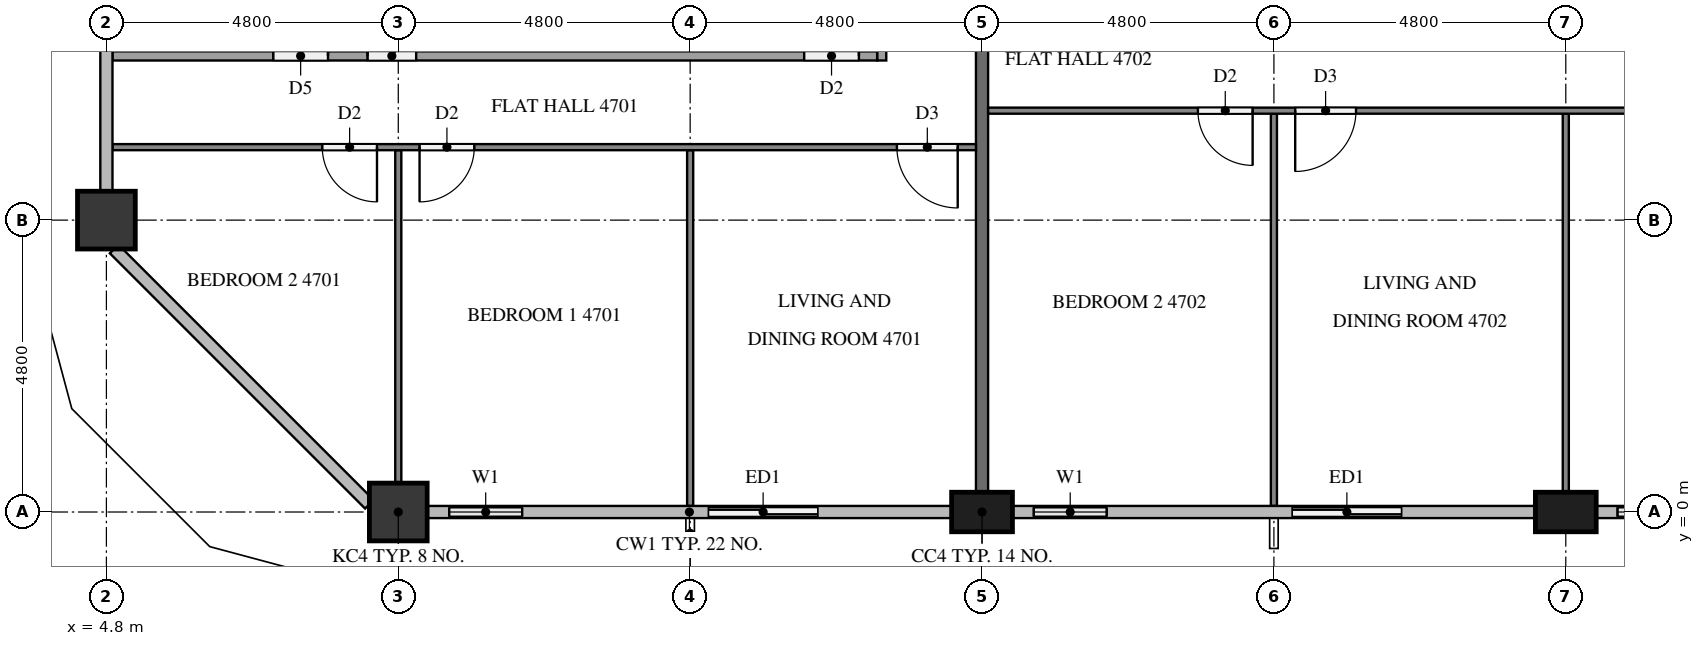
"""IFC4 building model, lengths in metres.
Left out: names, types, materials, properties, quantities, classifications, styles, units other than length and angle.
Written with IfcOpenShell. Run it as: python <this file> out.ifc"""

import sys

from ifc_helpers import new_model, si_unit, direction, frame, frame_2d, origin, origin_2d, place, context, subcontext, project, spatial, rectangle, extrude, element, fill, save


model = new_model("IFC4")
c1 = context("Model", 3, precision=1e-05, world=origin(), true_north=direction((0.0, 1.0)))
c2 = subcontext(c1, "Body", "Model", "MODEL_VIEW")
j1 = project(units=[si_unit("LENGTHUNIT", "METRE"), si_unit("PLANEANGLEUNIT", "RADIAN")], contexts=[c1])
p1 = place(None, origin())
s1 = spatial("IfcSite", under=j1, at=p1, CompositionType="ELEMENT")
p2 = place(p1, origin())
s2 = spatial("IfcBuilding", under=s1, at=p2, CompositionType="ELEMENT")
p3 = place(p2, frame((0.0, 0.0, 182.4)))
s3 = spatial("IfcBuildingStorey", under=s2, at=p3, CompositionType="ELEMENT", Elevation=182.4)
p4 = place(p3, frame((9.6, 0.0, 0.0), z_axis=(0.0, 0.0, 1.0), x_axis=(1.0, 0.0, 0.0)))
e1 = element("IfcColumn", 1, at=p4, inside=s3, PredefinedType="COLUMN", context=c2, shape_type="SweptSolid", body=[
    extrude(rectangle(XDim=0.95, YDim=0.95, at=origin_2d()), origin(), (0.0, 0.0, 1.0), 3.2),
])
for number, where, z_axis, x_axis in (
    (2, (19.2, 0.0, 0.0), (0.0, 0.0, 1.0), (1.0, 0.0, 0.0)),
    (3, (28.8, 0.0, 0.0), (0.0, 0.0, 1.0), (1.0, 0.0, 0.0)),
):
    element("IfcColumn", number, at=place(p3, frame(where, z_axis=z_axis, x_axis=x_axis)), inside=s3, PredefinedType="COLUMN", context=c2, shape_type="SweptSolid", body=[
        extrude(rectangle(XDim=1.0, YDim=0.65, at=origin_2d()), origin(), (0.0, 0.0, 1.0), 3.2),
    ])
p5 = place(p3, frame((4.8, 4.8, 0.0), z_axis=(0.0, 0.0, 1.0), x_axis=(1.0, 0.0, 0.0)))
e4 = element("IfcColumn", 4, at=p5, inside=s3, PredefinedType="COLUMN", context=c2, shape_type="SweptSolid", body=[
    extrude(rectangle(XDim=0.95, YDim=0.95, at=origin_2d()), origin(), (0.0, 0.0, 1.0), 3.2),
])
p6 = place(p3, frame((10.075, 0.0, 0.0), z_axis=(0.0, 0.0, 1.0), x_axis=(1.0, 0.0, 0.0)))
e5 = element("IfcWall", 5, at=p6, inside=s3, PredefinedType="SOLIDWALL", context=c2, shape_type="SweptSolid", body=[
    extrude(rectangle(XDim=1.925, YDim=0.15, at=frame_2d((0.962, 0.0))), origin(), (0.0, 0.0, 1.0), 3.2),
])
p7 = place(p6, frame((0.363, 0.0, 0.9)))
e6 = element("IfcOpeningElement", 6, at=p7, cuts=e5, PredefinedType="OPENING", context=c2, shape_type="SweptSolid", body=[
    extrude(rectangle(XDim=1.2, YDim=1.4, at=frame_2d((0.6, 0.7))), frame((0.0, 0.085, 0.0), z_axis=(0.0, -1.0, 0.0), x_axis=(1.0, 0.0, 0.0)), (0.0, 0.0, 1.0), 0.17),
])
p8 = place(p3, frame((14.4, 0.0, 0.0), z_axis=(0.0, 0.0, 1.0), x_axis=(1.0, 0.0, 0.0)))
e7 = element("IfcWall", 7, at=p8, inside=s3, PredefinedType="SOLIDWALL", context=c2, shape_type="SweptSolid", body=[
    extrude(rectangle(XDim=2.4, YDim=0.15, at=frame_2d((1.2, 0.0))), origin(), (0.0, 0.0, 1.0), 3.2),
])
p9 = place(p8, frame((0.3, 0.0, 0.0)))
e8 = element("IfcOpeningElement", 8, at=p9, cuts=e7, PredefinedType="OPENING", context=c2, shape_type="SweptSolid", body=[
    extrude(rectangle(XDim=1.8, YDim=2.4, at=frame_2d((0.9, 1.2))), frame((0.0, 0.085, 0.0), z_axis=(0.0, -1.0, 0.0), x_axis=(1.0, 0.0, 0.0)), (0.0, 0.0, 1.0), 0.17),
])
p10 = place(p3, frame((19.7, 0.0, 0.0), z_axis=(0.0, 0.0, 1.0), x_axis=(1.0, 0.0, 0.0)))
e9 = element("IfcWall", 9, at=p10, inside=s3, PredefinedType="SOLIDWALL", context=c2, shape_type="SweptSolid", body=[
    extrude(rectangle(XDim=1.9, YDim=0.15, at=frame_2d((0.95, 0.0))), origin(), (0.0, 0.0, 1.0), 3.2),
])
p11 = place(p10, frame((0.35, 0.0, 0.9)))
e10 = element("IfcOpeningElement", 10, at=p11, cuts=e9, PredefinedType="OPENING", context=c2, shape_type="SweptSolid", body=[
    extrude(rectangle(XDim=1.2, YDim=1.4, at=frame_2d((0.6, 0.7))), frame((0.0, 0.085, 0.0), z_axis=(0.0, -1.0, 0.0), x_axis=(1.0, 0.0, 0.0)), (0.0, 0.0, 1.0), 0.17),
])
p12 = place(p3, frame((24.0, 0.0, 0.0), z_axis=(0.0, 0.0, 1.0), x_axis=(1.0, 0.0, 0.0)))
e11 = element("IfcWall", 11, at=p12, inside=s3, PredefinedType="SOLIDWALL", context=c2, shape_type="SweptSolid", body=[
    extrude(rectangle(XDim=2.4, YDim=0.15, at=frame_2d((1.2, 0.0))), origin(), (0.0, 0.0, 1.0), 3.2),
])
p13 = place(p12, frame((0.3, 0.0, 0.0)))
e12 = element("IfcOpeningElement", 12, at=p13, cuts=e11, PredefinedType="OPENING", context=c2, shape_type="SweptSolid", body=[
    extrude(rectangle(XDim=1.8, YDim=2.4, at=frame_2d((0.9, 1.2))), frame((0.0, 0.085, 0.0), z_axis=(0.0, -1.0, 0.0), x_axis=(1.0, 0.0, 0.0)), (0.0, 0.0, 1.0), 0.17),
])
p14 = place(p3, frame((29.3, 0.0, 0.0), z_axis=(0.0, 0.0, 1.0), x_axis=(1.0, 0.0, 0.0)))
e13 = element("IfcWall", 13, at=p14, inside=s3, PredefinedType="SOLIDWALL", context=c2, shape_type="SweptSolid", body=[
    extrude(rectangle(XDim=1.9, YDim=0.15, at=frame_2d((0.95, 0.0))), origin(), (0.0, 0.0, 1.0), 3.2),
])
p15 = place(p14, frame((0.35, 0.0, 0.9)))
e14 = element("IfcOpeningElement", 14, at=p15, cuts=e13, PredefinedType="OPENING", context=c2, shape_type="SweptSolid", body=[
    extrude(rectangle(XDim=1.2, YDim=1.4, at=frame_2d((0.6, 0.7))), frame((0.0, 0.085, 0.0), z_axis=(0.0, -1.0, 0.0), x_axis=(1.0, 0.0, 0.0)), (0.0, 0.0, 1.0), 0.17),
])
p16 = place(p3, frame((19.2, 11.9, 0.0), z_axis=(0.0, 0.0, 1.0), x_axis=(0.0, -1.0, 0.0)))
e15 = element("IfcWall", 15, at=p16, inside=s3, PredefinedType="PARTITIONING", context=c2, shape_type="SweptSolid", body=[
    extrude(rectangle(XDim=11.575, YDim=0.2, at=frame_2d((5.788, 0.0))), origin(), (0.0, 0.0, 1.0), 3.2),
])
p17 = place(p3, frame((14.4, 5.95, 0.0), z_axis=(0.0, 0.0, 1.0), x_axis=(0.0, -1.0, 0.0)))
e16 = element("IfcWall", 16, at=p17, inside=s3, PredefinedType="PARTITIONING", context=c2, shape_type="SweptSolid", body=[
    extrude(rectangle(XDim=5.85, YDim=0.1, at=frame_2d((2.925, 0.0))), origin(), (0.0, 0.0, 1.0), 3.2),
])
p18 = place(p3, frame((9.6, 5.95, 0.0), z_axis=(0.0, 0.0, 1.0), x_axis=(0.0, -1.0, 0.0)))
e17 = element("IfcWall", 17, at=p18, inside=s3, PredefinedType="PARTITIONING", context=c2, shape_type="SweptSolid", body=[
    extrude(rectangle(XDim=5.475, YDim=0.1, at=frame_2d((2.737, 0.0))), origin(), (0.0, 0.0, 1.0), 3.2),
])
p19 = place(p3, frame((19.1, 6.0, 0.0), z_axis=(0.0, 0.0, 1.0), x_axis=(-1.0, 0.0, 0.0)))
e18 = element("IfcWall", 18, at=p19, inside=s3, PredefinedType="PARTITIONING", context=c2, shape_type="SweptSolid", body=[
    extrude(rectangle(XDim=14.2, YDim=0.1, at=frame_2d((7.1, 0.0))), origin(), (0.0, 0.0, 1.0), 3.2),
])
p20 = place(p19, frame((0.3, 0.0, 0.0)))
e19 = element("IfcOpeningElement", 19, at=p20, cuts=e18, PredefinedType="OPENING", context=c2, shape_type="SweptSolid", body=[
    extrude(rectangle(XDim=1.0, YDim=2.1, at=frame_2d((0.5, 1.05))), frame((0.0, 0.06, 0.0), z_axis=(0.0, -1.0, 0.0), x_axis=(1.0, 0.0, 0.0)), (0.0, 0.0, 1.0), 0.12),
])
p21 = place(p19, frame((8.25, 0.0, 0.0)))
e20 = element("IfcOpeningElement", 20, at=p21, cuts=e18, PredefinedType="OPENING", context=c2, shape_type="SweptSolid", body=[
    extrude(rectangle(XDim=0.9, YDim=2.1, at=frame_2d((0.45, 1.05))), frame((0.0, 0.06, 0.0), z_axis=(0.0, -1.0, 0.0), x_axis=(1.0, 0.0, 0.0)), (0.0, 0.0, 1.0), 0.12),
])
p22 = place(p19, frame((9.85, 0.0, 0.0)))
e21 = element("IfcOpeningElement", 21, at=p22, cuts=e18, PredefinedType="OPENING", context=c2, shape_type="SweptSolid", body=[
    extrude(rectangle(XDim=0.9, YDim=2.1, at=frame_2d((0.45, 1.05))), frame((0.0, 0.06, 0.0), z_axis=(0.0, -1.0, 0.0), x_axis=(1.0, 0.0, 0.0)), (0.0, 0.0, 1.0), 0.12),
])
p23 = place(p3, frame((17.55, 11.9, 0.0), z_axis=(0.0, 0.0, 1.0), x_axis=(0.0, -1.0, 0.0)))
e22 = element("IfcWall", 22, at=p23, inside=s3, PredefinedType="PARTITIONING", context=c2, shape_type="SweptSolid", body=[
    extrude(rectangle(XDim=4.475, YDim=0.15, at=frame_2d((2.237, 0.0))), origin(), (0.0, 0.0, 1.0), 3.2),
])
p24 = place(p3, frame((4.9, 7.5, 0.0), z_axis=(0.0, 0.0, 1.0), x_axis=(1.0, 0.0, 0.0)))
e23 = element("IfcWall", 23, at=p24, inside=s3, PredefinedType="PARTITIONING", context=c2, shape_type="SweptSolid", body=[
    extrude(rectangle(XDim=12.575, YDim=0.15, at=frame_2d((6.288, 0.0))), origin(), (0.0, 0.0, 1.0), 3.2),
])
p25 = place(p24, frame((11.375, 0.0, 0.0)))
e24 = element("IfcOpeningElement", 24, at=p25, cuts=e23, PredefinedType="OPENING", context=c2, shape_type="SweptSolid", body=[
    extrude(rectangle(XDim=0.9, YDim=2.1, at=frame_2d((0.45, 1.05))), frame((0.0, 0.085, 0.0), z_axis=(0.0, -1.0, 0.0), x_axis=(1.0, 0.0, 0.0)), (0.0, 0.0, 1.0), 0.17),
])
p26 = place(p24, frame((4.194, 0.0, 0.0)))
e25 = element("IfcOpeningElement", 25, at=p26, cuts=e23, PredefinedType="OPENING", context=c2, shape_type="SweptSolid", body=[
    extrude(rectangle(XDim=0.8, YDim=2.1, at=frame_2d((0.4, 1.05))), frame((0.0, 0.085, 0.0), z_axis=(0.0, -1.0, 0.0), x_axis=(1.0, 0.0, 0.0)), (0.0, 0.0, 1.0), 0.17),
])
p27 = place(p24, frame((2.644, 0.0, 0.0)))
e26 = element("IfcOpeningElement", 26, at=p27, cuts=e23, PredefinedType="OPENING", context=c2, shape_type="SweptSolid", body=[
    extrude(rectangle(XDim=0.9, YDim=2.1, at=frame_2d((0.45, 1.05))), frame((0.0, 0.085, 0.0), z_axis=(0.0, -1.0, 0.0), x_axis=(1.0, 0.0, 0.0)), (0.0, 0.0, 1.0), 0.17),
])
p28 = place(p3, frame((28.8, 6.55, 0.0), z_axis=(0.0, 0.0, 1.0), x_axis=(0.0, -1.0, 0.0)))
e27 = element("IfcWall", 27, at=p28, inside=s3, PredefinedType="PARTITIONING", context=c2, shape_type="SweptSolid", body=[
    extrude(rectangle(XDim=6.225, YDim=0.1, at=frame_2d((3.113, 0.0))), origin(), (0.0, 0.0, 1.0), 3.2),
])
p29 = place(p3, frame((24.0, 6.55, 0.0), z_axis=(0.0, 0.0, 1.0), x_axis=(0.0, -1.0, 0.0)))
e28 = element("IfcWall", 28, at=p29, inside=s3, PredefinedType="PARTITIONING", context=c2, shape_type="SweptSolid", body=[
    extrude(rectangle(XDim=6.45, YDim=0.1, at=frame_2d((3.225, 0.0))), origin(), (0.0, 0.0, 1.0), 3.2),
])
p30 = place(p3, frame((33.5, 6.6, 0.0), z_axis=(0.0, 0.0, 1.0), x_axis=(-1.0, 0.0, 0.0)))
e29 = element("IfcWall", 29, at=p30, inside=s3, PredefinedType="PARTITIONING", context=c2, shape_type="SweptSolid", body=[
    extrude(rectangle(XDim=14.2, YDim=0.1, at=frame_2d((7.1, 0.0))), origin(), (0.0, 0.0, 1.0), 3.2),
])
p31 = place(p30, frame((0.3, 0.0, 0.0)))
e30 = element("IfcOpeningElement", 30, at=p31, cuts=e29, PredefinedType="OPENING", context=c2, shape_type="SweptSolid", body=[
    extrude(rectangle(XDim=0.9, YDim=2.1, at=frame_2d((0.45, 1.05))), frame((0.0, 0.06, 0.0), z_axis=(0.0, -1.0, 0.0), x_axis=(1.0, 0.0, 0.0)), (0.0, 0.0, 1.0), 0.12),
])
p32 = place(p30, frame((8.15, 0.0, 0.0)))
e31 = element("IfcOpeningElement", 31, at=p32, cuts=e29, PredefinedType="OPENING", context=c2, shape_type="SweptSolid", body=[
    extrude(rectangle(XDim=1.0, YDim=2.1, at=frame_2d((0.5, 1.05))), frame((0.0, 0.06, 0.0), z_axis=(0.0, -1.0, 0.0), x_axis=(1.0, 0.0, 0.0)), (0.0, 0.0, 1.0), 0.12),
])
p33 = place(p30, frame((9.85, 0.0, 0.0)))
e32 = element("IfcOpeningElement", 32, at=p33, cuts=e29, PredefinedType="OPENING", context=c2, shape_type="SweptSolid", body=[
    extrude(rectangle(XDim=0.9, YDim=2.1, at=frame_2d((0.45, 1.05))), frame((0.0, 0.06, 0.0), z_axis=(0.0, -1.0, 0.0), x_axis=(1.0, 0.0, 0.0)), (0.0, 0.0, 1.0), 0.12),
])
p34 = place(p7, origin())
e33 = element("IfcWindow", 33, at=p34, inside=s3, PartitioningType="SINGLE_PANEL", PredefinedType="WINDOW", context=c2, shape_type="SweptSolid", body=[
    extrude(rectangle(XDim=1.2, YDim=1.4, at=frame_2d((0.6, 0.7))), frame((0.0, 0.03, 0.0), z_axis=(0.0, -1.0, 0.0), x_axis=(1.0, 0.0, 0.0)), (0.0, 0.0, 1.0), 0.06),
])
fill(e6, e33)
p35 = place(p9, origin())
e34 = element("IfcDoor", 34, at=p35, inside=s3, OperationType="SLIDING_TO_LEFT", PredefinedType="DOOR", context=c2, shape_type="SweptSolid", body=[
    extrude(rectangle(XDim=1.8, YDim=2.4, at=frame_2d((0.9, 1.2))), frame((0.0, 0.025, 0.0), z_axis=(0.0, -1.0, 0.0), x_axis=(1.0, 0.0, 0.0)), (0.0, 0.0, 1.0), 0.05),
])
fill(e8, e34)
p36 = place(p11, origin())
e35 = element("IfcWindow", 35, at=p36, inside=s3, PartitioningType="SINGLE_PANEL", PredefinedType="WINDOW", context=c2, shape_type="SweptSolid", body=[
    extrude(rectangle(XDim=1.2, YDim=1.4, at=frame_2d((0.6, 0.7))), frame((0.0, 0.03, 0.0), z_axis=(0.0, -1.0, 0.0), x_axis=(1.0, 0.0, 0.0)), (0.0, 0.0, 1.0), 0.06),
])
fill(e10, e35)
p37 = place(p13, origin())
e36 = element("IfcDoor", 36, at=p37, inside=s3, OperationType="SLIDING_TO_RIGHT", PredefinedType="DOOR", context=c2, shape_type="SweptSolid", body=[
    extrude(rectangle(XDim=1.8, YDim=2.4, at=frame_2d((0.9, 1.2))), frame((0.0, 0.025, 0.0), z_axis=(0.0, -1.0, 0.0), x_axis=(1.0, 0.0, 0.0)), (0.0, 0.0, 1.0), 0.05),
])
fill(e12, e36)
p38 = place(p15, origin())
e37 = element("IfcWindow", 37, at=p38, inside=s3, PartitioningType="SINGLE_PANEL", PredefinedType="WINDOW", context=c2, shape_type="SweptSolid", body=[
    extrude(rectangle(XDim=1.2, YDim=1.4, at=frame_2d((0.6, 0.7))), frame((0.0, 0.03, 0.0), z_axis=(0.0, -1.0, 0.0), x_axis=(1.0, 0.0, 0.0)), (0.0, 0.0, 1.0), 0.06),
])
fill(e14, e37)
p39 = place(p20, origin())
e38 = element("IfcDoor", 38, at=p39, inside=s3, OperationType="SINGLE_SWING_LEFT", PredefinedType="DOOR", context=c2, shape_type="SweptSolid", body=[
    extrude(rectangle(XDim=1.0, YDim=2.1, at=frame_2d((0.5, 1.05))), frame((0.0, 0.025, 0.0), z_axis=(0.0, -1.0, 0.0), x_axis=(1.0, 0.0, 0.0)), (0.0, 0.0, 1.0), 0.05),
])
fill(e19, e38)
p40 = place(p21, origin())
e39 = element("IfcDoor", 39, at=p40, inside=s3, OperationType="SINGLE_SWING_RIGHT", PredefinedType="DOOR", context=c2, shape_type="SweptSolid", body=[
    extrude(rectangle(XDim=0.9, YDim=2.1, at=frame_2d((0.45, 1.05))), frame((0.0, 0.025, 0.0), z_axis=(0.0, -1.0, 0.0), x_axis=(1.0, 0.0, 0.0)), (0.0, 0.0, 1.0), 0.05),
])
fill(e20, e39)
p41 = place(p22, origin())
e40 = element("IfcDoor", 40, at=p41, inside=s3, OperationType="SINGLE_SWING_LEFT", PredefinedType="DOOR", context=c2, shape_type="SweptSolid", body=[
    extrude(rectangle(XDim=0.9, YDim=2.1, at=frame_2d((0.45, 1.05))), frame((0.0, 0.025, 0.0), z_axis=(0.0, -1.0, 0.0), x_axis=(1.0, 0.0, 0.0)), (0.0, 0.0, 1.0), 0.05),
])
fill(e21, e40)
p42 = place(p25, origin())
e41 = element("IfcDoor", 41, at=p42, inside=s3, OperationType="SINGLE_SWING_RIGHT", PredefinedType="DOOR", context=c2, shape_type="SweptSolid", body=[
    extrude(rectangle(XDim=0.9, YDim=2.1, at=frame_2d((0.45, 1.05))), frame((0.0, 0.025, 0.0), z_axis=(0.0, -1.0, 0.0), x_axis=(1.0, 0.0, 0.0)), (0.0, 0.0, 1.0), 0.05),
])
fill(e24, e41)
p43 = place(p26, origin())
e42 = element("IfcDoor", 42, at=p43, inside=s3, OperationType="SINGLE_SWING_LEFT", PredefinedType="DOOR", context=c2, shape_type="SweptSolid", body=[
    extrude(rectangle(XDim=0.8, YDim=2.1, at=frame_2d((0.4, 1.05))), frame((0.0, 0.025, 0.0), z_axis=(0.0, -1.0, 0.0), x_axis=(1.0, 0.0, 0.0)), (0.0, 0.0, 1.0), 0.05),
])
fill(e25, e42)
p44 = place(p27, origin())
e43 = element("IfcDoor", 43, at=p44, inside=s3, OperationType="SINGLE_SWING_RIGHT", PredefinedType="DOOR", context=c2, shape_type="SweptSolid", body=[
    extrude(rectangle(XDim=0.9, YDim=2.1, at=frame_2d((0.45, 1.05))), frame((0.0, 0.025, 0.0), z_axis=(0.0, -1.0, 0.0), x_axis=(1.0, 0.0, 0.0)), (0.0, 0.0, 1.0), 0.05),
])
fill(e26, e43)
p45 = place(p32, origin())
e44 = element("IfcDoor", 44, at=p45, inside=s3, OperationType="SINGLE_SWING_RIGHT", PredefinedType="DOOR", context=c2, shape_type="SweptSolid", body=[
    extrude(rectangle(XDim=1.0, YDim=2.1, at=frame_2d((0.5, 1.05))), frame((0.0, 0.025, 0.0), z_axis=(0.0, -1.0, 0.0), x_axis=(1.0, 0.0, 0.0)), (0.0, 0.0, 1.0), 0.05),
])
fill(e31, e44)
p46 = place(p33, origin())
e45 = element("IfcDoor", 45, at=p46, inside=s3, OperationType="SINGLE_SWING_LEFT", PredefinedType="DOOR", context=c2, shape_type="SweptSolid", body=[
    extrude(rectangle(XDim=0.9, YDim=2.1, at=frame_2d((0.45, 1.05))), frame((0.0, 0.025, 0.0), z_axis=(0.0, -1.0, 0.0), x_axis=(1.0, 0.0, 0.0)), (0.0, 0.0, 1.0), 0.05),
])
fill(e32, e45)
save(model, sys.argv[1])
